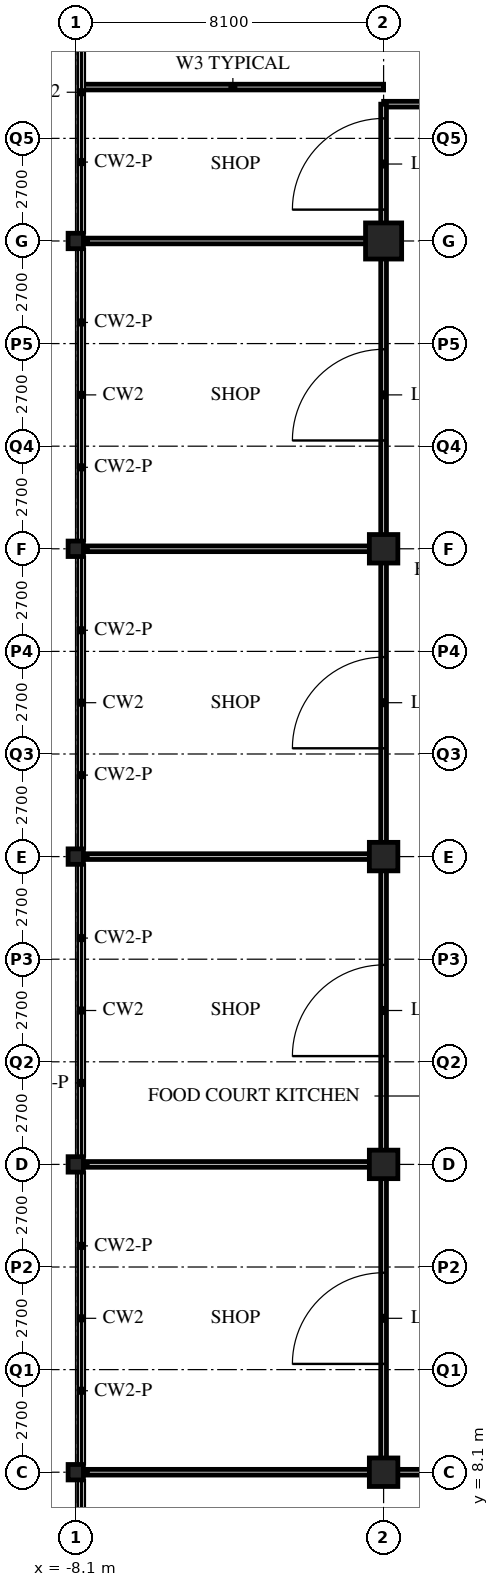
"""IFC4 building model, lengths in metres.
Left out: names, types, materials, properties, quantities, classifications, styles, units other than length and angle.
Written with IfcOpenShell. Run it as: python <this file> out.ifc"""

import sys

from ifc_helpers import new_model, si_unit, direction, frame, frame_2d, origin, origin_2d, place, context, subcontext, project, spatial, rectangle, hollow_rectangle, i_section, extrude, element, fill, save


model = new_model("IFC4")
c1 = context("Model", 3, precision=1e-05, world=origin(), true_north=direction((0.0, 1.0)))
c2 = subcontext(c1, "Body", "Model", "MODEL_VIEW")
j1 = project(units=[si_unit("LENGTHUNIT", "METRE"), si_unit("PLANEANGLEUNIT", "RADIAN")], contexts=[c1])
p1 = place(None, origin())
s1 = spatial("IfcSite", under=j1, at=p1, CompositionType="ELEMENT")
p2 = place(p1, origin())
s2 = spatial("IfcBuilding", under=s1, at=p2, CompositionType="ELEMENT")
p3 = place(p2, frame((0.0, 0.0, 11.4)))
s3 = spatial("IfcBuildingStorey", under=s2, at=p3, CompositionType="ELEMENT", Elevation=11.4)
for number, where, z_axis, x_axis in (
    (1, (-8.1, 8.1, 0.0), (0.0, 0.0, 1.0), (1.0, 0.0, 0.0)),
    (2, (-8.1, 16.2, 0.0), (0.0, 0.0, 1.0), (1.0, 0.0, 0.0)),
    (3, (-8.1, 24.3, 0.0), (0.0, 0.0, 1.0), (1.0, 0.0, 0.0)),
    (4, (-8.1, 32.4, 0.0), (0.0, 0.0, 1.0), (1.0, 0.0, 0.0)),
    (5, (-8.1, 40.5, 0.0), (0.0, 0.0, 1.0), (1.0, 0.0, 0.0)),
):
    element("IfcColumn", number, at=place(p3, frame(where, z_axis=z_axis, x_axis=x_axis)), inside=s3, PredefinedType="COLUMN", context=c2, shape_type="SweptSolid", body=[
        extrude(i_section(OverallWidth=0.403, OverallDepth=0.406, WebThickness=0.027, FlangeThickness=0.043, FilletRadius=0.015, at=origin_2d()), origin(), (0.0, 0.0, 1.0), 5.4),
    ])
for number, where, z_axis, x_axis in (
    (6, (0.0, 8.1, 0.0), (0.0, 0.0, 1.0), (1.0, 0.0, 0.0)),
    (7, (0.0, 16.2, 0.0), (0.0, 0.0, 1.0), (1.0, 0.0, 0.0)),
    (8, (0.0, 24.3, 0.0), (0.0, 0.0, 1.0), (1.0, 0.0, 0.0)),
    (9, (0.0, 32.4, 0.0), (0.0, 0.0, 1.0), (1.0, 0.0, 0.0)),
):
    element("IfcColumn", number, at=place(p3, frame(where, z_axis=z_axis, x_axis=x_axis)), inside=s3, PredefinedType="COLUMN", context=c2, shape_type="SweptSolid", body=[
        extrude(hollow_rectangle(XDim=0.75, YDim=0.75, WallThickness=0.07, at=origin_2d()), origin(), (0.0, 0.0, 1.0), 5.4),
    ])
p4 = place(p3, frame((0.0, 40.5, 0.0), z_axis=(0.0, 0.0, 1.0), x_axis=(1.0, 0.0, 0.0)))
e10 = element("IfcColumn", 10, at=p4, inside=s3, PredefinedType="COLUMN", context=c2, shape_type="SweptSolid", body=[
    extrude(hollow_rectangle(XDim=0.95, YDim=0.95, WallThickness=0.1, at=origin_2d()), origin(), (0.0, 0.0, 1.0), 5.4),
])
p5 = place(p3, frame((0.0, 8.1, 0.0), z_axis=(0.0, 0.0, 1.0), x_axis=(1.0, 0.0, 0.0)))
e11 = element("IfcWall", 11, at=p5, inside=s3, PredefinedType="PARTITIONING", context=c2, shape_type="SweptSolid", body=[
    extrude(rectangle(XDim=56.7, YDim=0.15, at=frame_2d((28.35, 0.0))), origin(), (0.0, 0.0, 1.0), 4.538),
])
p6 = place(p5, frame((17.05, 0.0, 0.0)))
e12 = element("IfcOpeningElement", 12, at=p6, cuts=e11, PredefinedType="OPENING", context=c2, shape_type="SweptSolid", body=[
    extrude(rectangle(XDim=1.8, YDim=2.4, at=frame_2d((0.9, 1.2))), frame((0.0, 0.085, 0.0), z_axis=(0.0, -1.0, 0.0), x_axis=(1.0, 0.0, 0.0)), (0.0, 0.0, 1.0), 0.17),
])
p7 = place(p5, frame((27.15, 0.0, 0.0)))
e13 = element("IfcOpeningElement", 13, at=p7, cuts=e11, PredefinedType="OPENING", context=c2, shape_type="SweptSolid", body=[
    extrude(rectangle(XDim=2.4, YDim=2.7, at=frame_2d((1.2, 1.35))), frame((0.0, 0.085, 0.0), z_axis=(0.0, -1.0, 0.0), x_axis=(1.0, 0.0, 0.0)), (0.0, 0.0, 1.0), 0.17),
])
p8 = place(p5, frame((35.25, 0.0, 0.0)))
e14 = element("IfcOpeningElement", 14, at=p8, cuts=e11, PredefinedType="OPENING", context=c2, shape_type="SweptSolid", body=[
    extrude(rectangle(XDim=2.4, YDim=2.7, at=frame_2d((1.2, 1.35))), frame((0.0, 0.085, 0.0), z_axis=(0.0, -1.0, 0.0), x_axis=(1.0, 0.0, 0.0)), (0.0, 0.0, 1.0), 0.17),
])
p9 = place(p5, frame((43.65, 0.0, 0.0)))
e15 = element("IfcOpeningElement", 15, at=p9, cuts=e11, PredefinedType="OPENING", context=c2, shape_type="SweptSolid", body=[
    extrude(rectangle(XDim=1.8, YDim=2.4, at=frame_2d((0.9, 1.2))), frame((0.0, 0.085, 0.0), z_axis=(0.0, -1.0, 0.0), x_axis=(1.0, 0.0, 0.0)), (0.0, 0.0, 1.0), 0.17),
])
p10 = place(p5, frame((2.85, 0.0, 0.0)))
e16 = element("IfcOpeningElement", 16, at=p10, cuts=e11, PredefinedType="OPENING", context=c2, shape_type="SweptSolid", body=[
    extrude(rectangle(XDim=2.4, YDim=2.7, at=frame_2d((1.2, 1.35))), frame((0.0, 0.085, 0.0), z_axis=(0.0, -1.0, 0.0), x_axis=(1.0, 0.0, 0.0)), (0.0, 0.0, 1.0), 0.17),
])
p11 = place(p5, frame((51.45, 0.0, 0.0)))
e17 = element("IfcOpeningElement", 17, at=p11, cuts=e11, PredefinedType="OPENING", context=c2, shape_type="SweptSolid", body=[
    extrude(rectangle(XDim=2.4, YDim=2.7, at=frame_2d((1.2, 1.35))), frame((0.0, 0.085, 0.0), z_axis=(0.0, -1.0, 0.0), x_axis=(1.0, 0.0, 0.0)), (0.0, 0.0, 1.0), 0.17),
])
p12 = place(p3, frame((0.0, 44.1, 0.0), z_axis=(0.0, 0.0, 1.0), x_axis=(1.0, 0.0, 0.0)))
e18 = element("IfcWall", 18, at=p12, inside=s3, PredefinedType="PARTITIONING", context=c2, shape_type="SweptSolid", body=[
    extrude(rectangle(XDim=56.7, YDim=0.15, at=frame_2d((28.35, 0.0))), origin(), (0.0, 0.0, 1.0), 5.15),
])
p13 = place(p12, frame((10.95, 0.0, 0.0)))
e19 = element("IfcOpeningElement", 19, at=p13, cuts=e18, PredefinedType="OPENING", context=c2, shape_type="SweptSolid", body=[
    extrude(rectangle(XDim=2.4, YDim=2.7, at=frame_2d((1.2, 1.35))), frame((0.0, 0.085, 0.0), z_axis=(0.0, -1.0, 0.0), x_axis=(1.0, 0.0, 0.0)), (0.0, 0.0, 1.0), 0.17),
])
p14 = place(p12, frame((19.05, 0.0, 0.0)))
e20 = element("IfcOpeningElement", 20, at=p14, cuts=e18, PredefinedType="OPENING", context=c2, shape_type="SweptSolid", body=[
    extrude(rectangle(XDim=2.4, YDim=2.7, at=frame_2d((1.2, 1.35))), frame((0.0, 0.085, 0.0), z_axis=(0.0, -1.0, 0.0), x_axis=(1.0, 0.0, 0.0)), (0.0, 0.0, 1.0), 0.17),
])
p15 = place(p12, frame((27.15, 0.0, 0.0)))
e21 = element("IfcOpeningElement", 21, at=p15, cuts=e18, PredefinedType="OPENING", context=c2, shape_type="SweptSolid", body=[
    extrude(rectangle(XDim=2.4, YDim=2.7, at=frame_2d((1.2, 1.35))), frame((0.0, 0.085, 0.0), z_axis=(0.0, -1.0, 0.0), x_axis=(1.0, 0.0, 0.0)), (0.0, 0.0, 1.0), 0.17),
])
p16 = place(p12, frame((35.25, 0.0, 0.0)))
e22 = element("IfcOpeningElement", 22, at=p16, cuts=e18, PredefinedType="OPENING", context=c2, shape_type="SweptSolid", body=[
    extrude(rectangle(XDim=2.4, YDim=2.7, at=frame_2d((1.2, 1.35))), frame((0.0, 0.085, 0.0), z_axis=(0.0, -1.0, 0.0), x_axis=(1.0, 0.0, 0.0)), (0.0, 0.0, 1.0), 0.17),
])
p17 = place(p12, frame((43.35, 0.0, 0.0)))
e23 = element("IfcOpeningElement", 23, at=p17, cuts=e18, PredefinedType="OPENING", context=c2, shape_type="SweptSolid", body=[
    extrude(rectangle(XDim=2.4, YDim=2.7, at=frame_2d((1.2, 1.35))), frame((0.0, 0.085, 0.0), z_axis=(0.0, -1.0, 0.0), x_axis=(1.0, 0.0, 0.0)), (0.0, 0.0, 1.0), 0.17),
])
p18 = place(p12, frame((53.45, 0.0, 0.0)))
e24 = element("IfcOpeningElement", 24, at=p18, cuts=e18, PredefinedType="OPENING", context=c2, shape_type="SweptSolid", body=[
    extrude(rectangle(XDim=2.4, YDim=2.7, at=frame_2d((1.2, 1.35))), frame((0.0, 0.085, 0.0), z_axis=(0.0, -1.0, 0.0), x_axis=(1.0, 0.0, 0.0)), (0.0, 0.0, 1.0), 0.17),
])
p19 = place(p12, frame((4.85, 0.0, 0.0)))
e25 = element("IfcOpeningElement", 25, at=p19, cuts=e18, PredefinedType="OPENING", context=c2, shape_type="SweptSolid", body=[
    extrude(rectangle(XDim=2.4, YDim=2.7, at=frame_2d((1.2, 1.35))), frame((0.0, 0.085, 0.0), z_axis=(0.0, -1.0, 0.0), x_axis=(1.0, 0.0, 0.0)), (0.0, 0.0, 1.0), 0.17),
])
p20 = place(p3, frame((0.0, 8.1, 0.0), z_axis=(0.0, 0.0, 1.0), x_axis=(0.0, 1.0, 0.0)))
e26 = element("IfcWall", 26, at=p20, inside=s3, PredefinedType="PARTITIONING", context=c2, shape_type="SweptSolid", body=[
    extrude(rectangle(XDim=36.0, YDim=0.15, at=frame_2d((18.0, 0.0))), origin(), (0.0, 0.0, 1.0), 4.538),
])
p21 = place(p20, frame((2.85, 0.0, 0.0)))
e27 = element("IfcOpeningElement", 27, at=p21, cuts=e26, PredefinedType="OPENING", context=c2, shape_type="SweptSolid", body=[
    extrude(rectangle(XDim=2.4, YDim=2.7, at=frame_2d((1.2, 1.35))), frame((0.0, 0.085, 0.0), z_axis=(0.0, -1.0, 0.0), x_axis=(1.0, 0.0, 0.0)), (0.0, 0.0, 1.0), 0.17),
])
p22 = place(p20, frame((10.95, 0.0, 0.0)))
e28 = element("IfcOpeningElement", 28, at=p22, cuts=e26, PredefinedType="OPENING", context=c2, shape_type="SweptSolid", body=[
    extrude(rectangle(XDim=2.4, YDim=2.7, at=frame_2d((1.2, 1.35))), frame((0.0, 0.085, 0.0), z_axis=(0.0, -1.0, 0.0), x_axis=(1.0, 0.0, 0.0)), (0.0, 0.0, 1.0), 0.17),
])
p23 = place(p20, frame((19.05, 0.0, 0.0)))
e29 = element("IfcOpeningElement", 29, at=p23, cuts=e26, PredefinedType="OPENING", context=c2, shape_type="SweptSolid", body=[
    extrude(rectangle(XDim=2.4, YDim=2.7, at=frame_2d((1.2, 1.35))), frame((0.0, 0.085, 0.0), z_axis=(0.0, -1.0, 0.0), x_axis=(1.0, 0.0, 0.0)), (0.0, 0.0, 1.0), 0.17),
])
p24 = place(p20, frame((27.15, 0.0, 0.0)))
e30 = element("IfcOpeningElement", 30, at=p24, cuts=e26, PredefinedType="OPENING", context=c2, shape_type="SweptSolid", body=[
    extrude(rectangle(XDim=2.4, YDim=2.7, at=frame_2d((1.2, 1.35))), frame((0.0, 0.085, 0.0), z_axis=(0.0, -1.0, 0.0), x_axis=(1.0, 0.0, 0.0)), (0.0, 0.0, 1.0), 0.17),
])
p25 = place(p20, frame((33.225, 0.0, 0.0)))
e31 = element("IfcOpeningElement", 31, at=p25, cuts=e26, PredefinedType="OPENING", context=c2, shape_type="SweptSolid", body=[
    extrude(rectangle(XDim=2.4, YDim=2.7, at=frame_2d((1.2, 1.35))), frame((0.0, 0.085, 0.0), z_axis=(0.0, -1.0, 0.0), x_axis=(1.0, 0.0, 0.0)), (0.0, 0.0, 1.0), 0.17),
])
for number, where, z_axis, x_axis in (
    (32, (0.0, 16.2, 0.0), (0.0, 0.0, 1.0), (-1.0, 0.0, 0.0)),
    (33, (0.0, 24.3, 0.0), (0.0, 0.0, 1.0), (-1.0, 0.0, 0.0)),
    (34, (0.0, 32.4, 0.0), (0.0, 0.0, 1.0), (-1.0, 0.0, 0.0)),
    (35, (0.0, 40.5, 0.0), (0.0, 0.0, 1.0), (-1.0, 0.0, 0.0)),
    (36, (-7.8, 8.1, 0.0), (0.0, 0.0, 1.0), (1.0, 0.0, 0.0)),
):
    element("IfcWall", number, at=place(p3, frame(where, z_axis=z_axis, x_axis=x_axis)), inside=s3, PredefinedType="PARTITIONING", context=c2, shape_type="SweptSolid", body=[
        extrude(rectangle(XDim=7.8, YDim=0.15, at=frame_2d((3.9, 0.0))), origin(), (0.0, 0.0, 1.0), 4.538),
    ])
p26 = place(p3, frame((-7.932, 44.55, 0.0), z_axis=(0.0, 0.0, 1.0), x_axis=(1.0, 0.0, 0.0)))
e37 = element("IfcWall", 37, at=p26, inside=s3, PredefinedType="PARTITIONING", context=c2, shape_type="SweptSolid", body=[
    extrude(rectangle(XDim=7.932, YDim=0.15, at=frame_2d((3.966, 0.0))), origin(), (0.0, 0.0, 1.0), 5.15),
])
p27 = place(p21, origin())
e38 = element("IfcDoor", 38, at=p27, inside=s3, OperationType="DOUBLE_DOOR_SINGLE_SWING", PredefinedType="DOOR", context=c2, shape_type="SweptSolid", body=[
    extrude(rectangle(XDim=2.4, YDim=2.7, at=frame_2d((1.2, 1.35))), frame((0.0, 0.025, 0.0), z_axis=(0.0, -1.0, 0.0), x_axis=(1.0, 0.0, 0.0)), (0.0, 0.0, 1.0), 0.05),
])
fill(e27, e38)
p28 = place(p22, origin())
e39 = element("IfcDoor", 39, at=p28, inside=s3, OperationType="DOUBLE_DOOR_SINGLE_SWING", PredefinedType="DOOR", context=c2, shape_type="SweptSolid", body=[
    extrude(rectangle(XDim=2.4, YDim=2.7, at=frame_2d((1.2, 1.35))), frame((0.0, 0.025, 0.0), z_axis=(0.0, -1.0, 0.0), x_axis=(1.0, 0.0, 0.0)), (0.0, 0.0, 1.0), 0.05),
])
fill(e28, e39)
p29 = place(p23, origin())
e40 = element("IfcDoor", 40, at=p29, inside=s3, OperationType="DOUBLE_DOOR_SINGLE_SWING", PredefinedType="DOOR", context=c2, shape_type="SweptSolid", body=[
    extrude(rectangle(XDim=2.4, YDim=2.7, at=frame_2d((1.2, 1.35))), frame((0.0, 0.025, 0.0), z_axis=(0.0, -1.0, 0.0), x_axis=(1.0, 0.0, 0.0)), (0.0, 0.0, 1.0), 0.05),
])
fill(e29, e40)
p30 = place(p24, origin())
e41 = element("IfcDoor", 41, at=p30, inside=s3, OperationType="DOUBLE_DOOR_SINGLE_SWING", PredefinedType="DOOR", context=c2, shape_type="SweptSolid", body=[
    extrude(rectangle(XDim=2.4, YDim=2.7, at=frame_2d((1.2, 1.35))), frame((0.0, 0.025, 0.0), z_axis=(0.0, -1.0, 0.0), x_axis=(1.0, 0.0, 0.0)), (0.0, 0.0, 1.0), 0.05),
])
fill(e30, e41)
p31 = place(p25, origin())
e42 = element("IfcDoor", 42, at=p31, inside=s3, OperationType="DOUBLE_DOOR_SINGLE_SWING", PredefinedType="DOOR", context=c2, shape_type="SweptSolid", body=[
    extrude(rectangle(XDim=2.4, YDim=2.7, at=frame_2d((1.2, 1.35))), frame((0.0, 0.025, 0.0), z_axis=(0.0, -1.0, 0.0), x_axis=(1.0, 0.0, 0.0)), (0.0, 0.0, 1.0), 0.05),
])
fill(e31, e42)
save(model, sys.argv[1])
